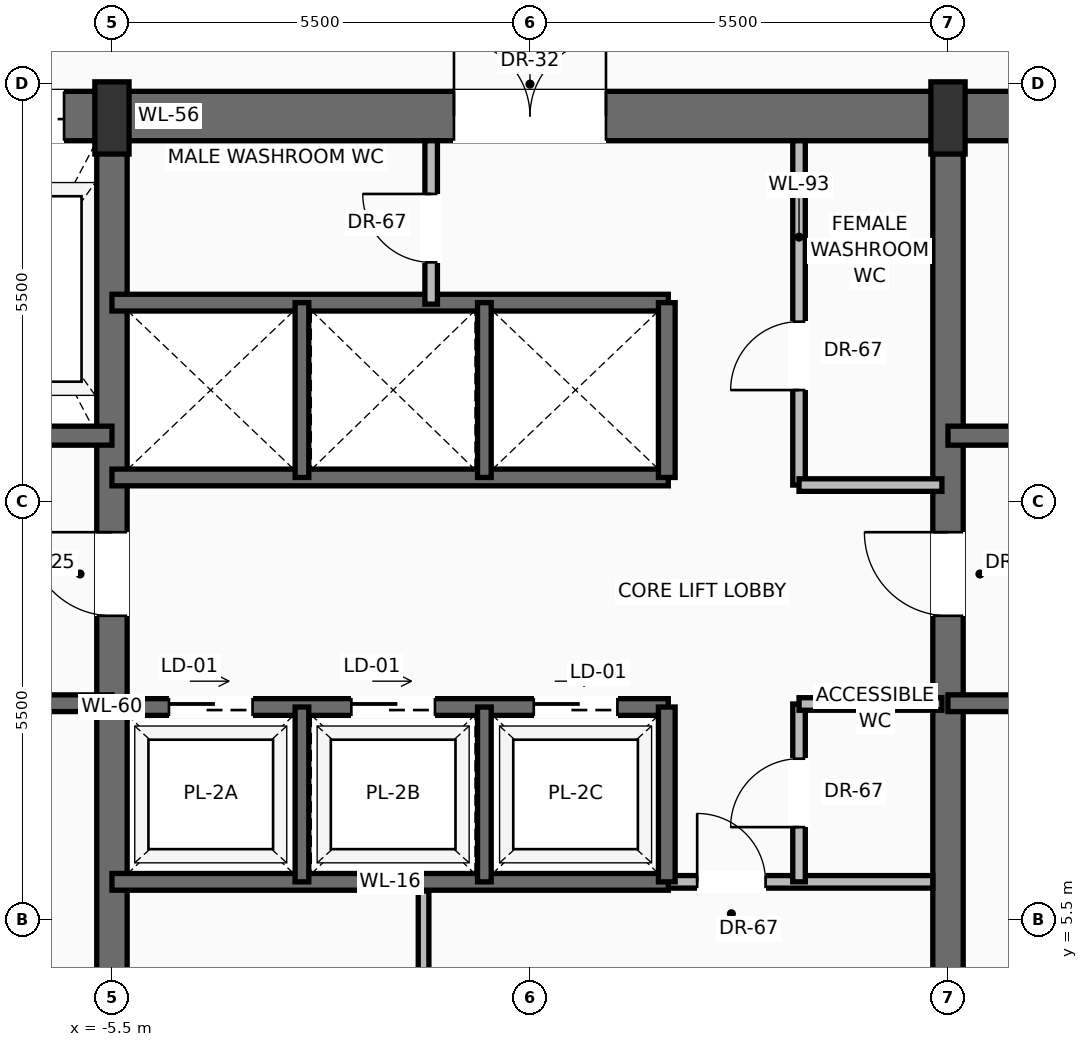
"""IFC4 building model, lengths in metres.
Left out: names, types, materials, properties, quantities, classifications, styles, units other than length and angle.
Written with IfcOpenShell. Run it as: python <this file> out.ifc"""

import sys

from ifc_helpers import new_model, si_unit, direction, frame, frame_2d, origin, origin_2d, place, context, subcontext, project, spatial, rectangle, extrude, source, transform, mapped, element, fill, save


model = new_model("IFC4")
c1 = context("Model", 3, precision=1e-05, world=origin(), true_north=direction((0.0, 1.0)))
c2 = subcontext(c1, "Body", "Model", "MODEL_VIEW")
j1 = project(units=[si_unit("LENGTHUNIT", "METRE"), si_unit("PLANEANGLEUNIT", "RADIAN")], contexts=[c1])
p1 = place(None, origin())
s1 = spatial("IfcSite", under=j1, at=p1, CompositionType="ELEMENT")
p2 = place(p1, origin())
s2 = spatial("IfcBuilding", under=s1, at=p2, CompositionType="ELEMENT")
p3 = place(p2, frame((0.0, 0.0, 211.7)))
s3 = spatial("IfcBuildingStorey", under=s2, at=p3, CompositionType="ELEMENT", Elevation=211.7)
p4 = place(p3, frame((-10.8, 16.075, 0.0), z_axis=(0.0, 0.0, 1.0), x_axis=(1.0, 0.0, 0.0)))
e1 = element("IfcWall", 1, at=p4, inside=s3, PredefinedType="SHEAR", context=c2, shape_type="SweptSolid", body=[
    extrude(rectangle(XDim=21.6, YDim=0.65, at=frame_2d((10.8, 0.0))), origin(), (0.0, 0.0, 1.0), 3.42),
])
p5 = place(p4, frame((3.37, 0.0, 0.0)))
e2 = element("IfcOpeningElement", 2, at=p5, cuts=e1, PredefinedType="OPENING", context=c2, shape_type="SweptSolid", body=[
    extrude(rectangle(XDim=1.3, YDim=2.3, at=frame_2d((0.65, 1.15))), frame((0.0, 0.335, 0.0), z_axis=(0.0, -1.0, 0.0), x_axis=(1.0, 0.0, 0.0)), (0.0, 0.0, 1.0), 0.67),
])
p6 = place(p4, frame((9.8, 0.0, 0.0)))
e3 = element("IfcOpeningElement", 3, at=p6, cuts=e1, PredefinedType="OPENING", context=c2, shape_type="SweptSolid", body=[
    extrude(rectangle(XDim=2.0, YDim=2.4, at=frame_2d((1.0, 1.2))), frame((0.0, 0.335, 0.0), z_axis=(0.0, -1.0, 0.0), x_axis=(1.0, 0.0, 0.0)), (0.0, 0.0, 1.0), 0.67),
])
p7 = place(p3, frame((-5.5, 0.525, 0.0), z_axis=(0.0, 0.0, 1.0), x_axis=(0.0, 1.0, 0.0)))
e4 = element("IfcWall", 4, at=p7, inside=s3, PredefinedType="SHEAR", context=c2, shape_type="SweptSolid", body=[
    extrude(rectangle(XDim=15.55, YDim=0.4, at=frame_2d((7.775, 0.0))), origin(), (0.0, 0.0, 1.0), 3.42),
])
p8 = place(p7, frame((8.975, 0.0, 0.0)))
e5 = element("IfcOpeningElement", 5, at=p8, cuts=e4, PredefinedType="OPENING", context=c2, shape_type="SweptSolid", body=[
    extrude(rectangle(XDim=1.1, YDim=2.2, at=frame_2d((0.55, 1.1))), frame((0.0, 0.21, 0.0), z_axis=(0.0, -1.0, 0.0), x_axis=(1.0, 0.0, 0.0)), (0.0, 0.0, 1.0), 0.42),
])
p9 = place(p3, frame((5.5, 0.525, 0.0), z_axis=(0.0, 0.0, 1.0), x_axis=(0.0, 1.0, 0.0)))
e6 = element("IfcWall", 6, at=p9, inside=s3, PredefinedType="SHEAR", context=c2, shape_type="SweptSolid", body=[
    extrude(rectangle(XDim=15.55, YDim=0.4, at=frame_2d((7.775, 0.0))), origin(), (0.0, 0.0, 1.0), 3.42),
])
p10 = place(p9, frame((8.975, 0.0, 0.0)))
e7 = element("IfcOpeningElement", 7, at=p10, cuts=e6, PredefinedType="OPENING", context=c2, shape_type="SweptSolid", body=[
    extrude(rectangle(XDim=1.1, YDim=2.2, at=frame_2d((0.55, 1.1))), frame((0.0, 0.21, 0.0), z_axis=(0.0, -1.0, 0.0), x_axis=(1.0, 0.0, 0.0)), (0.0, 0.0, 1.0), 0.42),
])
m1 = source(origin(), c2, "Body", "SweptSolid", [
    extrude(rectangle(XDim=0.45, YDim=0.95, at=origin_2d()), origin(), (0.0, 0.0, 1.0), 3.7),
])
for number, where, z_axis, x_axis in (
    (8, (-5.5, 16.05, 0.0), (0.0, 0.0, 1.0), (1.0, 0.0, 0.0)),
    (9, (5.5, 16.05, 0.0), (0.0, 0.0, 1.0), (1.0, 0.0, 0.0)),
):
    element("IfcColumn", number, at=place(p3, frame(where, z_axis=z_axis, x_axis=x_axis)), inside=s3, PredefinedType="PILASTER", context=c2, shape_type="MappedRepresentation", body=[
        mapped(m1, transform((0.0, 0.0, 0.0), scale=1.0)),
    ])
p11 = place(p3, frame((-5.5, 8.35, 0.0), z_axis=(0.0, 0.0, 1.0), x_axis=(-1.0, 0.0, 0.0)))
e10 = element("IfcWall", 10, at=p11, inside=s3, PredefinedType="SOLIDWALL", context=c2, shape_type="SweptSolid", body=[
    extrude(rectangle(XDim=4.65, YDim=0.22, at=frame_2d((2.325, 0.0))), origin(), (0.0, 0.0, 1.0), 3.42),
])
p12 = place(p11, frame((2.5, 0.0, 0.0)))
e11 = element("IfcOpeningElement", 11, at=p12, cuts=e10, PredefinedType="OPENING", context=c2, shape_type="SweptSolid", body=[
    extrude(rectangle(XDim=1.15, YDim=2.2, at=frame_2d((0.575, 1.1))), frame((0.0, 0.12, 0.0), z_axis=(0.0, -1.0, 0.0), x_axis=(1.0, 0.0, 0.0)), (0.0, 0.0, 1.0), 0.24),
])
p13 = place(p3, frame((-5.5, 11.87, 0.0), z_axis=(0.0, 0.0, 1.0), x_axis=(-1.0, 0.0, 0.0)))
e12 = element("IfcWall", 12, at=p13, inside=s3, PredefinedType="SOLIDWALL", context=c2, shape_type="SweptSolid", body=[
    extrude(rectangle(XDim=4.65, YDim=0.25, at=frame_2d((2.325, 0.0))), origin(), (0.0, 0.0, 1.0), 3.42),
])
p14 = place(p13, frame((2.95, 0.0, 0.0)))
e13 = element("IfcOpeningElement", 13, at=p14, cuts=e12, PredefinedType="OPENING", context=c2, shape_type="SweptSolid", body=[
    extrude(rectangle(XDim=1.2, YDim=2.25, at=frame_2d((0.6, 1.125))), frame((0.0, 0.135, 0.0), z_axis=(0.0, -1.0, 0.0), x_axis=(1.0, 0.0, 0.0)), (0.0, 0.0, 1.0), 0.27),
])
p15 = place(p3, frame((10.15, 8.35, 0.0), z_axis=(0.0, 0.0, 1.0), x_axis=(-1.0, 0.0, 0.0)))
e14 = element("IfcWall", 14, at=p15, inside=s3, PredefinedType="SOLIDWALL", context=c2, shape_type="SweptSolid", body=[
    extrude(rectangle(XDim=4.65, YDim=0.22, at=frame_2d((2.325, 0.0))), origin(), (0.0, 0.0, 1.0), 3.42),
])
p16 = place(p15, frame((1.0, 0.0, 0.0)))
e15 = element("IfcOpeningElement", 15, at=p16, cuts=e14, PredefinedType="OPENING", context=c2, shape_type="SweptSolid", body=[
    extrude(rectangle(XDim=1.15, YDim=2.2, at=frame_2d((0.575, 1.1))), frame((0.0, 0.12, 0.0), z_axis=(0.0, -1.0, 0.0), x_axis=(1.0, 0.0, 0.0)), (0.0, 0.0, 1.0), 0.24),
])
p17 = place(p3, frame((10.15, 11.87, 0.0), z_axis=(0.0, 0.0, 1.0), x_axis=(-1.0, 0.0, 0.0)))
e16 = element("IfcWall", 16, at=p17, inside=s3, PredefinedType="SOLIDWALL", context=c2, shape_type="SweptSolid", body=[
    extrude(rectangle(XDim=4.65, YDim=0.25, at=frame_2d((2.325, 0.0))), origin(), (0.0, 0.0, 1.0), 3.42),
])
p18 = place(p17, frame((0.5, 0.0, 0.0)))
e17 = element("IfcOpeningElement", 17, at=p18, cuts=e16, PredefinedType="OPENING", context=c2, shape_type="SweptSolid", body=[
    extrude(rectangle(XDim=1.2, YDim=2.25, at=frame_2d((0.6, 1.125))), frame((0.0, 0.135, 0.0), z_axis=(0.0, -1.0, 0.0), x_axis=(1.0, 0.0, 0.0)), (0.0, 0.0, 1.0), 0.27),
])
p19 = place(p3, frame((1.82, 6.0, 0.0), z_axis=(0.0, 0.0, 1.0), x_axis=(1.0, 0.0, 0.0)))
e18 = element("IfcWall", 18, at=p19, inside=s3, PredefinedType="PARTITIONING", context=c2, shape_type="SweptSolid", body=[
    extrude(rectangle(XDim=3.48, YDim=0.165, at=frame_2d((1.74, 0.0))), origin(), (0.0, 0.0, 1.0), 3.412),
])
p20 = place(p19, frame((0.38, 0.0, 0.0)))
e19 = element("IfcOpeningElement", 19, at=p20, cuts=e18, PredefinedType="OPENING", context=c2, shape_type="SweptSolid", body=[
    extrude(rectangle(XDim=0.9, YDim=2.1, at=frame_2d((0.45, 1.05))), frame((0.0, 0.093, 0.0), z_axis=(0.0, -1.0, 0.0), x_axis=(1.0, 0.0, 0.0)), (0.0, 0.0, 1.0), 0.185),
])
p21 = place(p3, frame((-1.4, 0.85, 0.0), z_axis=(0.0, 0.0, 1.0), x_axis=(0.0, 1.0, 0.0)))
e20 = element("IfcWall", 20, at=p21, inside=s3, PredefinedType="PARTITIONING", context=c2, shape_type="SweptSolid", body=[
    extrude(rectangle(XDim=5.03, YDim=0.14, at=frame_2d((2.515, 0.0))), origin(), (0.0, 0.0, 1.0), 3.412),
])
p22 = place(p21, frame((2.1, 0.0, 0.0)))
e21 = element("IfcOpeningElement", 21, at=p22, cuts=e20, PredefinedType="OPENING", context=c2, shape_type="SweptSolid", body=[
    extrude(rectangle(XDim=0.9, YDim=2.1, at=frame_2d((0.45, 1.05))), frame((0.0, 0.08, 0.0), z_axis=(0.0, -1.0, 0.0), x_axis=(1.0, 0.0, 0.0)), (0.0, 0.0, 1.0), 0.16),
])
p23 = place(p3, frame((3.54, 6.0, 0.0), z_axis=(0.0, 0.0, 1.0), x_axis=(0.0, 1.0, 0.0)))
e22 = element("IfcWall", 22, at=p23, inside=s3, PredefinedType="PARTITIONING", context=c2, shape_type="SweptSolid", body=[
    extrude(rectangle(XDim=2.34, YDim=0.165, at=frame_2d((1.17, 0.0))), origin(), (0.0, 0.0, 1.0), 3.412),
])
p24 = place(p23, frame((0.72, 0.0, 0.0)))
e23 = element("IfcOpeningElement", 23, at=p24, cuts=e22, PredefinedType="OPENING", context=c2, shape_type="SweptSolid", body=[
    extrude(rectangle(XDim=0.9, YDim=2.1, at=frame_2d((0.45, 1.05))), frame((0.0, 0.093, 0.0), z_axis=(0.0, -1.0, 0.0), x_axis=(1.0, 0.0, 0.0)), (0.0, 0.0, 1.0), 0.185),
])
p25 = place(p3, frame((3.54, 8.34, 0.0), z_axis=(0.0, 0.0, 1.0), x_axis=(1.0, 0.0, 0.0)))
e24 = element("IfcWall", 24, at=p25, inside=s3, PredefinedType="PARTITIONING", context=c2, shape_type="SweptSolid", body=[
    extrude(rectangle(XDim=1.88, YDim=0.165, at=frame_2d((0.94, 0.0))), origin(), (0.0, 0.0, 1.0), 3.412),
])
p26 = place(p3, frame((-5.5, 6.0, 0.0), z_axis=(0.0, 0.0, 1.0), x_axis=(1.0, 0.0, 0.0)))
e25 = element("IfcWall", 25, at=p26, inside=s3, PredefinedType="SOLIDWALL", context=c2, shape_type="SweptSolid", body=[
    extrude(rectangle(XDim=7.32, YDim=0.22, at=frame_2d((3.66, 0.0))), origin(), (0.0, 0.0, 1.0), 3.42),
])
p27 = place(p3, frame((-5.5, 8.3, 0.0), z_axis=(0.0, 0.0, 1.0), x_axis=(1.0, 0.0, 0.0)))
e26 = element("IfcWall", 26, at=p27, inside=s3, PredefinedType="SOLIDWALL", context=c2, shape_type="SweptSolid", body=[
    extrude(rectangle(XDim=7.32, YDim=0.22, at=frame_2d((3.66, 0.0))), origin(), (0.0, 0.0, 1.0), 3.42),
])
p28 = place(p27, frame((0.75, 0.0, 0.0)))
e27 = element("IfcOpeningElement", 27, at=p28, cuts=e26, PredefinedType="OPENING", context=c2, shape_type="SweptSolid", body=[
    extrude(rectangle(XDim=1.1, YDim=2.2, at=frame_2d((0.55, 1.1))), frame((0.0, 0.12, 0.0), z_axis=(0.0, -1.0, 0.0), x_axis=(1.0, 0.0, 0.0)), (0.0, 0.0, 1.0), 0.24),
])
p29 = place(p27, frame((3.15, 0.0, 0.0)))
e28 = element("IfcOpeningElement", 28, at=p29, cuts=e26, PredefinedType="OPENING", context=c2, shape_type="SweptSolid", body=[
    extrude(rectangle(XDim=1.1, YDim=2.2, at=frame_2d((0.55, 1.1))), frame((0.0, 0.12, 0.0), z_axis=(0.0, -1.0, 0.0), x_axis=(1.0, 0.0, 0.0)), (0.0, 0.0, 1.0), 0.24),
])
p30 = place(p27, frame((5.55, 0.0, 0.0)))
e29 = element("IfcOpeningElement", 29, at=p30, cuts=e26, PredefinedType="OPENING", context=c2, shape_type="SweptSolid", body=[
    extrude(rectangle(XDim=1.1, YDim=2.2, at=frame_2d((0.55, 1.1))), frame((0.0, 0.12, 0.0), z_axis=(0.0, -1.0, 0.0), x_axis=(1.0, 0.0, 0.0)), (0.0, 0.0, 1.0), 0.24),
])
p31 = place(p3, frame((1.8, 6.0, 0.0), z_axis=(0.0, 0.0, 1.0), x_axis=(0.0, 1.0, 0.0)))
e30 = element("IfcWall", 30, at=p31, inside=s3, PredefinedType="SOLIDWALL", context=c2, shape_type="SweptSolid", body=[
    extrude(rectangle(XDim=2.3, YDim=0.22, at=frame_2d((1.15, 0.0))), origin(), (0.0, 0.0, 1.0), 3.42),
])
for number, where, z_axis, x_axis in (
    (31, (-3.0, 6.0, 0.0), (0.0, 0.0, 1.0), (0.0, 1.0, 0.0)),
    (32, (-0.6, 6.0, 0.0), (0.0, 0.0, 1.0), (0.0, 1.0, 0.0)),
):
    element("IfcWall", number, at=place(p3, frame(where, z_axis=z_axis, x_axis=x_axis)), inside=s3, PredefinedType="SOLIDWALL", context=c2, shape_type="SweptSolid", body=[
        extrude(rectangle(XDim=2.3, YDim=0.18, at=frame_2d((1.15, 0.0))), origin(), (0.0, 0.0, 1.0), 3.42),
    ])
for number, where, z_axis, x_axis in (
    (33, (-5.5, 11.32, 0.0), (0.0, 0.0, 1.0), (1.0, 0.0, 0.0)),
    (34, (-5.5, 13.62, 0.0), (0.0, 0.0, 1.0), (1.0, 0.0, 0.0)),
):
    element("IfcWall", number, at=place(p3, frame(where, z_axis=z_axis, x_axis=x_axis)), inside=s3, PredefinedType="SOLIDWALL", context=c2, shape_type="SweptSolid", body=[
        extrude(rectangle(XDim=7.32, YDim=0.22, at=frame_2d((3.66, 0.0))), origin(), (0.0, 0.0, 1.0), 3.42),
    ])
p32 = place(p3, frame((1.8, 11.32, 0.0), z_axis=(0.0, 0.0, 1.0), x_axis=(0.0, 1.0, 0.0)))
e35 = element("IfcWall", 35, at=p32, inside=s3, PredefinedType="SOLIDWALL", context=c2, shape_type="SweptSolid", body=[
    extrude(rectangle(XDim=2.3, YDim=0.22, at=frame_2d((1.15, 0.0))), origin(), (0.0, 0.0, 1.0), 3.42),
])
for number, where, z_axis, x_axis in (
    (36, (-3.0, 11.32, 0.0), (0.0, 0.0, 1.0), (0.0, 1.0, 0.0)),
    (37, (-0.6, 11.32, 0.0), (0.0, 0.0, 1.0), (0.0, 1.0, 0.0)),
):
    element("IfcWall", number, at=place(p3, frame(where, z_axis=z_axis, x_axis=x_axis)), inside=s3, PredefinedType="SOLIDWALL", context=c2, shape_type="SweptSolid", body=[
        extrude(rectangle(XDim=2.3, YDim=0.18, at=frame_2d((1.15, 0.0))), origin(), (0.0, 0.0, 1.0), 3.42),
    ])
p33 = place(p3, frame((-1.3, 13.6, 0.0), z_axis=(0.0, 0.0, 1.0), x_axis=(0.0, 1.0, 0.0)))
e38 = element("IfcWall", 38, at=p33, inside=s3, PredefinedType="PARTITIONING", context=c2, shape_type="SweptSolid", body=[
    extrude(rectangle(XDim=2.15, YDim=0.165, at=frame_2d((1.075, 0.0))), origin(), (0.0, 0.0, 1.0), 3.412),
])
p34 = place(p33, frame((0.55, 0.0, 0.0)))
e39 = element("IfcOpeningElement", 39, at=p34, cuts=e38, PredefinedType="OPENING", context=c2, shape_type="SweptSolid", body=[
    extrude(rectangle(XDim=0.9, YDim=2.1, at=frame_2d((0.45, 1.05))), frame((0.0, 0.093, 0.0), z_axis=(0.0, -1.0, 0.0), x_axis=(1.0, 0.0, 0.0)), (0.0, 0.0, 1.0), 0.185),
])
p35 = place(p3, frame((3.54, 11.22, 0.0), z_axis=(0.0, 0.0, 1.0), x_axis=(0.0, 1.0, 0.0)))
e40 = element("IfcWall", 40, at=p35, inside=s3, PredefinedType="PARTITIONING", context=c2, shape_type="SweptSolid", body=[
    extrude(rectangle(XDim=4.53, YDim=0.165, at=frame_2d((2.265, 0.0))), origin(), (0.0, 0.0, 1.0), 3.412),
])
p36 = place(p35, frame((1.25, 0.0, 0.0)))
e41 = element("IfcOpeningElement", 41, at=p36, cuts=e40, PredefinedType="OPENING", context=c2, shape_type="SweptSolid", body=[
    extrude(rectangle(XDim=0.9, YDim=2.1, at=frame_2d((0.45, 1.05))), frame((0.0, 0.093, 0.0), z_axis=(0.0, -1.0, 0.0), x_axis=(1.0, 0.0, 0.0)), (0.0, 0.0, 1.0), 0.185),
])
p37 = place(p3, frame((3.54, 11.22, 0.0), z_axis=(0.0, 0.0, 1.0), x_axis=(1.0, 0.0, 0.0)))
e42 = element("IfcWall", 42, at=p37, inside=s3, PredefinedType="PARTITIONING", context=c2, shape_type="SweptSolid", body=[
    extrude(rectangle(XDim=1.88, YDim=0.165, at=frame_2d((0.94, 0.0))), origin(), (0.0, 0.0, 1.0), 3.412),
])
m2 = source(origin(), c2, "Body", "SweptSolid", [
    extrude(rectangle(XDim=1.1, YDim=2.2, at=frame_2d((0.55, 1.1))), frame((0.0, 0.025, 0.0), z_axis=(0.0, -1.0, 0.0), x_axis=(1.0, 0.0, 0.0)), (0.0, 0.0, 1.0), 0.05),
])
p38 = place(p8, origin())
e43 = element("IfcDoor", 43, at=p38, inside=s3, OperationType="SINGLE_SWING_RIGHT", PredefinedType="DOOR", context=c2, shape_type="MappedRepresentation", body=[
    mapped(m2, transform((0.0, 0.0, 0.0), scale=1.0)),
])
fill(e5, e43)
m3 = source(origin(), c2, "Body", "SweptSolid", [
    extrude(rectangle(XDim=1.3, YDim=2.3, at=frame_2d((0.65, 1.15))), frame((0.0, 0.025, 0.0), z_axis=(0.0, -1.0, 0.0), x_axis=(1.0, 0.0, 0.0)), (0.0, 0.0, 1.0), 0.05),
])
p39 = place(p5, origin())
e44 = element("IfcDoor", 44, at=p39, inside=s3, OperationType="SLIDING_TO_RIGHT", PredefinedType="DOOR", context=c2, shape_type="MappedRepresentation", body=[
    mapped(m3, transform((0.0, 0.0, 0.0), scale=1.0)),
])
fill(e2, e44)
p40 = place(p10, origin())
e45 = element("IfcDoor", 45, at=p40, inside=s3, OperationType="SINGLE_SWING_RIGHT", PredefinedType="DOOR", context=c2, shape_type="MappedRepresentation", body=[
    mapped(m2, transform((0.0, 0.0, 0.0), scale=1.0)),
])
fill(e7, e45)
m4 = source(origin(), c2, "Body", "SweptSolid", [
    extrude(rectangle(XDim=2.0, YDim=2.4, at=frame_2d((1.0, 1.2))), frame((0.0, 0.025, 0.0), z_axis=(0.0, -1.0, 0.0), x_axis=(1.0, 0.0, 0.0)), (0.0, 0.0, 1.0), 0.05),
])
p41 = place(p6, origin())
e46 = element("IfcDoor", 46, at=p41, inside=s3, OperationType="DOUBLE_DOOR_SINGLE_SWING", PredefinedType="DOOR", context=c2, shape_type="MappedRepresentation", body=[
    mapped(m4, transform((0.0, 0.0, 0.0), scale=1.0)),
])
fill(e3, e46)
m5 = source(origin(), c2, "Body", "SweptSolid", [
    extrude(rectangle(XDim=0.9, YDim=2.1, at=frame_2d((0.45, 1.05))), frame((0.0, 0.025, 0.0), z_axis=(0.0, -1.0, 0.0), x_axis=(1.0, 0.0, 0.0)), (0.0, 0.0, 1.0), 0.05),
])
p42 = place(p20, origin())
e47 = element("IfcDoor", 47, at=p42, inside=s3, OperationType="SINGLE_SWING_LEFT", PredefinedType="DOOR", context=c2, shape_type="MappedRepresentation", body=[
    mapped(m5, transform((0.0, 0.0, 0.0), scale=1.0)),
])
fill(e19, e47)
p43 = place(p24, origin())
e48 = element("IfcDoor", 48, at=p43, inside=s3, OperationType="SINGLE_SWING_LEFT", PredefinedType="DOOR", context=c2, shape_type="MappedRepresentation", body=[
    mapped(m5, transform((0.0, 0.0, 0.0), scale=1.0)),
])
fill(e23, e48)
m6 = source(origin(), c2, "Body", "SweptSolid", [
    extrude(rectangle(XDim=1.1, YDim=2.2, at=frame_2d((0.55, 1.1))), frame((0.0, 0.025, 0.0), z_axis=(0.0, -1.0, 0.0), x_axis=(1.0, 0.0, 0.0)), (0.0, 0.0, 1.0), 0.05),
])
p44 = place(p28, origin())
e49 = element("IfcDoor", 49, at=p44, inside=s3, OperationType="SLIDING_TO_LEFT", PredefinedType="DOOR", context=c2, shape_type="MappedRepresentation", body=[
    mapped(m6, transform((0.0, 0.0, 0.0), scale=1.0)),
])
fill(e27, e49)
p45 = place(p29, origin())
e50 = element("IfcDoor", 50, at=p45, inside=s3, OperationType="SLIDING_TO_LEFT", PredefinedType="DOOR", context=c2, shape_type="MappedRepresentation", body=[
    mapped(m6, transform((0.0, 0.0, 0.0), scale=1.0)),
])
fill(e28, e50)
p46 = place(p30, origin())
e51 = element("IfcDoor", 51, at=p46, inside=s3, OperationType="SLIDING_TO_LEFT", PredefinedType="DOOR", context=c2, shape_type="MappedRepresentation", body=[
    mapped(m6, transform((0.0, 0.0, 0.0), scale=1.0)),
])
fill(e29, e51)
p47 = place(p34, origin())
e52 = element("IfcDoor", 52, at=p47, inside=s3, OperationType="SINGLE_SWING_RIGHT", PredefinedType="DOOR", context=c2, shape_type="MappedRepresentation", body=[
    mapped(m5, transform((0.0, 0.0, 0.0), scale=1.0)),
])
fill(e39, e52)
p48 = place(p36, origin())
e53 = element("IfcDoor", 53, at=p48, inside=s3, OperationType="SINGLE_SWING_LEFT", PredefinedType="DOOR", context=c2, shape_type="MappedRepresentation", body=[
    mapped(m5, transform((0.0, 0.0, 0.0), scale=1.0)),
])
fill(e41, e53)
save(model, sys.argv[1])
